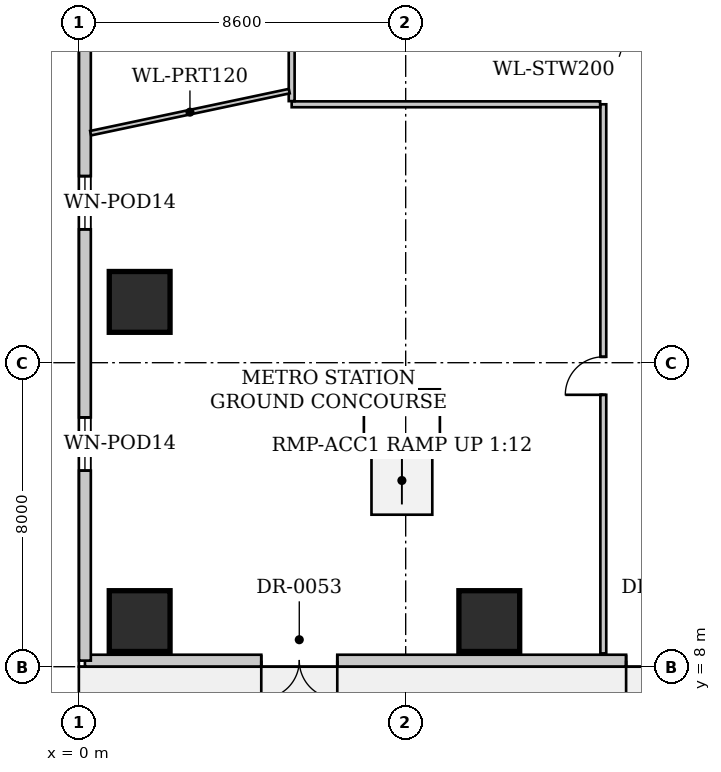
"""IFC4 building model, lengths in metres.
Left out: names, types, materials, properties, quantities, classifications, styles, units other than length and angle.
Written with IfcOpenShell. Run it as: python <this file> out.ifc"""

import sys

from ifc_helpers import new_model, si_unit, direction, frame, frame_2d, origin, origin_2d, place, context, subcontext, project, spatial, rectangle, extrude, source, transform, mapped, element, fill, save


model = new_model("IFC4")
c1 = context("Model", 3, precision=1e-05, world=origin(), true_north=direction((0.0, 1.0)))
c2 = subcontext(c1, "Body", "Model", "MODEL_VIEW")
j1 = project(units=[si_unit("LENGTHUNIT", "METRE"), si_unit("PLANEANGLEUNIT", "RADIAN")], contexts=[c1])
p1 = place(None, origin())
s1 = spatial("IfcSite", under=j1, at=p1, CompositionType="ELEMENT")
p2 = place(p1, origin())
s2 = spatial("IfcBuilding", under=s1, at=p2, CompositionType="ELEMENT")
p3 = place(p2, origin())
s3 = spatial("IfcBuildingStorey", under=s2, at=p3, CompositionType="ELEMENT", Elevation=0.0)
for number, where, z_axis, x_axis in (
    (1, (1.6, 9.2, 0.0), (0.0, 0.0, 1.0), (1.0, 0.0, 0.0)),
    (2, (1.6, 17.6, 0.0), (0.0, 0.0, 1.0), (1.0, 0.0, 0.0)),
    (3, (10.8, 9.2, 0.0), (0.0, 0.0, 1.0), (1.0, 0.0, 0.0)),
):
    element("IfcColumn", number, at=place(p3, frame(where, z_axis=z_axis, x_axis=x_axis)), inside=s3, PredefinedType="COLUMN", context=c2, shape_type="SweptSolid", body=[
        extrude(rectangle(XDim=1.6, YDim=1.6, at=origin_2d()), origin(), (0.0, 0.0, 1.0), 4.9),
    ])
p4 = place(p3, frame((18.0, 8.16, 0.0), z_axis=(0.0, 0.0, 1.0), x_axis=(-1.0, 0.0, 0.0)))
e4 = element("IfcWall", 4, at=p4, inside=s3, PredefinedType="SOLIDWALL", context=c2, shape_type="SweptSolid", body=[
    extrude(rectangle(XDim=17.84, YDim=0.31, at=frame_2d((8.92, 0.0))), origin(), (0.0, 0.0, 1.0), 4.65),
])
p5 = place(p4, frame((1.6, 0.0, 0.0)))
e5 = element("IfcOpeningElement", 5, at=p5, cuts=e4, PredefinedType="OPENING", context=c2, shape_type="SweptSolid", body=[
    extrude(rectangle(XDim=2.0, YDim=2.4, at=frame_2d((1.0, 1.2))), frame((0.0, 0.165, 0.0), z_axis=(0.0, -1.0, 0.0), x_axis=(1.0, 0.0, 0.0)), (0.0, 0.0, 1.0), 0.33),
])
p6 = place(p4, frame((11.2, 0.0, 0.0)))
e6 = element("IfcOpeningElement", 6, at=p6, cuts=e4, PredefinedType="OPENING", context=c2, shape_type="SweptSolid", body=[
    extrude(rectangle(XDim=2.0, YDim=2.4, at=frame_2d((1.0, 1.2))), frame((0.0, 0.165, 0.0), z_axis=(0.0, -1.0, 0.0), x_axis=(1.0, 0.0, 0.0)), (0.0, 0.0, 1.0), 0.33),
])
p7 = place(p3, frame((0.16, 8.16, 0.0), z_axis=(0.0, 0.0, 1.0), x_axis=(0.0, 1.0, 0.0)))
e7 = element("IfcWall", 7, at=p7, inside=s3, PredefinedType="SOLIDWALL", context=c2, shape_type="SweptSolid", body=[
    extrude(rectangle(XDim=39.68, YDim=0.31, at=frame_2d((19.84, 0.0))), origin(), (0.0, 0.0, 1.0), 4.65),
])
p8 = place(p7, frame((5.0, 0.0, 0.95)))
e8 = element("IfcOpeningElement", 8, at=p8, cuts=e7, PredefinedType="OPENING", context=c2, shape_type="SweptSolid", body=[
    extrude(rectangle(XDim=1.4, YDim=2.2, at=frame_2d((0.7, 1.1))), frame((0.0, 0.165, 0.0), z_axis=(0.0, -1.0, 0.0), x_axis=(1.0, 0.0, 0.0)), (0.0, 0.0, 1.0), 0.33),
])
p9 = place(p7, frame((11.35, 0.0, 0.95)))
e9 = element("IfcOpeningElement", 9, at=p9, cuts=e7, PredefinedType="OPENING", context=c2, shape_type="SweptSolid", body=[
    extrude(rectangle(XDim=1.4, YDim=2.2, at=frame_2d((0.7, 1.1))), frame((0.0, 0.165, 0.0), z_axis=(0.0, -1.0, 0.0), x_axis=(1.0, 0.0, 0.0)), (0.0, 0.0, 1.0), 0.33),
])
p10 = place(p7, frame((22.0, 0.0, 0.95)))
e10 = element("IfcOpeningElement", 10, at=p10, cuts=e7, PredefinedType="OPENING", context=c2, shape_type="SweptSolid", body=[
    extrude(rectangle(XDim=1.4, YDim=2.2, at=frame_2d((0.7, 1.1))), frame((0.0, 0.165, 0.0), z_axis=(0.0, -1.0, 0.0), x_axis=(1.0, 0.0, 0.0)), (0.0, 0.0, 1.0), 0.33),
])
p11 = place(p7, frame((31.0, 0.0, 0.95)))
e11 = element("IfcOpeningElement", 11, at=p11, cuts=e7, PredefinedType="OPENING", context=c2, shape_type="SweptSolid", body=[
    extrude(rectangle(XDim=1.4, YDim=2.2, at=frame_2d((0.7, 1.1))), frame((0.0, 0.165, 0.0), z_axis=(0.0, -1.0, 0.0), x_axis=(1.0, 0.0, 0.0)), (0.0, 0.0, 1.0), 0.33),
])
p12 = place(p7, frame((28.7, 0.0, 0.0)))
e12 = element("IfcOpeningElement", 12, at=p12, cuts=e7, PredefinedType="OPENING", context=c2, shape_type="SweptSolid", body=[
    extrude(rectangle(XDim=1.6, YDim=2.35, at=frame_2d((0.8, 1.175))), frame((0.0, 0.165, 0.0), z_axis=(0.0, -1.0, 0.0), x_axis=(1.0, 0.0, 0.0)), (0.0, 0.0, 1.0), 0.33),
])
p13 = place(p3, frame((13.8, 8.35, 0.0), z_axis=(0.0, 0.0, 1.0), x_axis=(0.0, 1.0, 0.0)))
e13 = element("IfcWall", 13, at=p13, inside=s3, PredefinedType="PARTITIONING", context=c2, shape_type="SweptSolid", body=[
    extrude(rectangle(XDim=14.45, YDim=0.155, at=frame_2d((7.225, 0.0))), origin(), (0.0, 0.0, 1.0), 4.9),
])
p14 = place(p13, frame((6.805, 0.0, 0.0)))
e14 = element("IfcOpeningElement", 14, at=p14, cuts=e13, PredefinedType="OPENING", context=c2, shape_type="SweptSolid", body=[
    extrude(rectangle(XDim=1.0, YDim=2.15, at=frame_2d((0.5, 1.075))), frame((0.0, 0.087, 0.0), z_axis=(0.0, -1.0, 0.0), x_axis=(1.0, 0.0, 0.0)), (0.0, 0.0, 1.0), 0.175),
])
p15 = place(p3, frame((13.717, 22.8, 0.0), z_axis=(0.0, 0.0, 1.0), x_axis=(-1.0, 0.0, 0.0)))
e15 = element("IfcWall", 15, at=p15, inside=s3, PredefinedType="PARTITIONING", context=c2, shape_type="SweptSolid", body=[
    extrude(rectangle(XDim=8.116, YDim=0.155, at=frame_2d((4.058, 0.0))), origin(), (0.0, 0.0, 1.0), 4.9),
])
p16 = place(p3, frame((5.6, 22.884, 0.0), z_axis=(0.0, 0.0, 1.0), x_axis=(0.0, 1.0, 0.0)))
e16 = element("IfcWall", 16, at=p16, inside=s3, PredefinedType="PARTITIONING", context=c2, shape_type="SweptSolid", body=[
    extrude(rectangle(XDim=3.237, YDim=0.155, at=frame_2d((1.618, 0.0))), origin(), (0.0, 0.0, 1.0), 4.9),
])
p17 = place(p3, frame((0.31, 22.04, 0.0), z_axis=(0.0, 0.0, 1.0), x_axis=(0.97831641384, 0.207115896086, 0.0)))
e17 = element("IfcWall", 17, at=p17, inside=s3, PredefinedType="PARTITIONING", context=c2, shape_type="SweptSolid", body=[
    extrude(rectangle(XDim=5.342, YDim=0.12, at=frame_2d((2.671, 0.0))), origin(), (0.0, 0.0, 1.0), 4.9),
])
m1 = source(origin(), c2, "Body", "SweptSolid", [
    extrude(rectangle(XDim=1.4, YDim=2.2, at=frame_2d((0.7, 1.1))), frame((0.0, 0.03, 0.0), z_axis=(0.0, -1.0, 0.0), x_axis=(1.0, 0.0, 0.0)), (0.0, 0.0, 1.0), 0.06),
])
p18 = place(p8, origin())
e18 = element("IfcWindow", 18, at=p18, inside=s3, PartitioningType="SINGLE_PANEL", PredefinedType="WINDOW", context=c2, shape_type="MappedRepresentation", body=[
    mapped(m1, transform((0.0, 0.0, 0.0), x_axis=(1.0, 0.0, 0.0), y_axis=(0.0, 1.0, 0.0), z_axis=(0.0, 0.0, 1.0), scale=1.0)),
])
fill(e8, e18)
p19 = place(p9, origin())
e19 = element("IfcWindow", 19, at=p19, inside=s3, PartitioningType="SINGLE_PANEL", PredefinedType="WINDOW", context=c2, shape_type="MappedRepresentation", body=[
    mapped(m1, transform((0.0, 0.0, 0.0), x_axis=(1.0, 0.0, 0.0), y_axis=(0.0, 1.0, 0.0), z_axis=(0.0, 0.0, 1.0), scale=1.0)),
])
fill(e9, e19)
m2 = source(origin(), c2, "Body", "SweptSolid", [
    extrude(rectangle(XDim=2.0, YDim=2.4, at=frame_2d((1.0, 1.2))), frame((0.0, 0.025, 0.0), z_axis=(0.0, -1.0, 0.0), x_axis=(1.0, 0.0, 0.0)), (0.0, 0.0, 1.0), 0.05),
])
p20 = place(p5, origin())
e20 = element("IfcDoor", 20, at=p20, inside=s3, OperationType="DOUBLE_DOOR_SINGLE_SWING", PredefinedType="DOOR", context=c2, shape_type="MappedRepresentation", body=[
    mapped(m2, transform((0.0, 0.0, 0.0), x_axis=(1.0, 0.0, 0.0), y_axis=(0.0, 1.0, 0.0), z_axis=(0.0, 0.0, 1.0), scale=1.0)),
])
fill(e5, e20)
p21 = place(p6, origin())
e21 = element("IfcDoor", 21, at=p21, inside=s3, OperationType="DOUBLE_DOOR_SINGLE_SWING", PredefinedType="DOOR", context=c2, shape_type="MappedRepresentation", body=[
    mapped(m2, transform((0.0, 0.0, 0.0), x_axis=(1.0, 0.0, 0.0), y_axis=(0.0, 1.0, 0.0), z_axis=(0.0, 0.0, 1.0), scale=1.0)),
])
fill(e6, e21)
m3 = source(origin(), c2, "Body", "SweptSolid", [
    extrude(rectangle(XDim=1.0, YDim=2.15, at=frame_2d((0.5, 1.075))), frame((0.0, 0.025, 0.0), z_axis=(0.0, -1.0, 0.0), x_axis=(1.0, 0.0, 0.0)), (0.0, 0.0, 1.0), 0.05),
])
p22 = place(p14, origin())
e22 = element("IfcDoor", 22, at=p22, inside=s3, OperationType="SINGLE_SWING_LEFT", PredefinedType="DOOR", context=c2, shape_type="MappedRepresentation", body=[
    mapped(m3, transform((0.0, 0.0, 0.0), x_axis=(1.0, 0.0, 0.0), y_axis=(0.0, 1.0, 0.0), z_axis=(0.0, 0.0, 1.0), scale=1.0)),
])
fill(e14, e22)
save(model, sys.argv[1])
